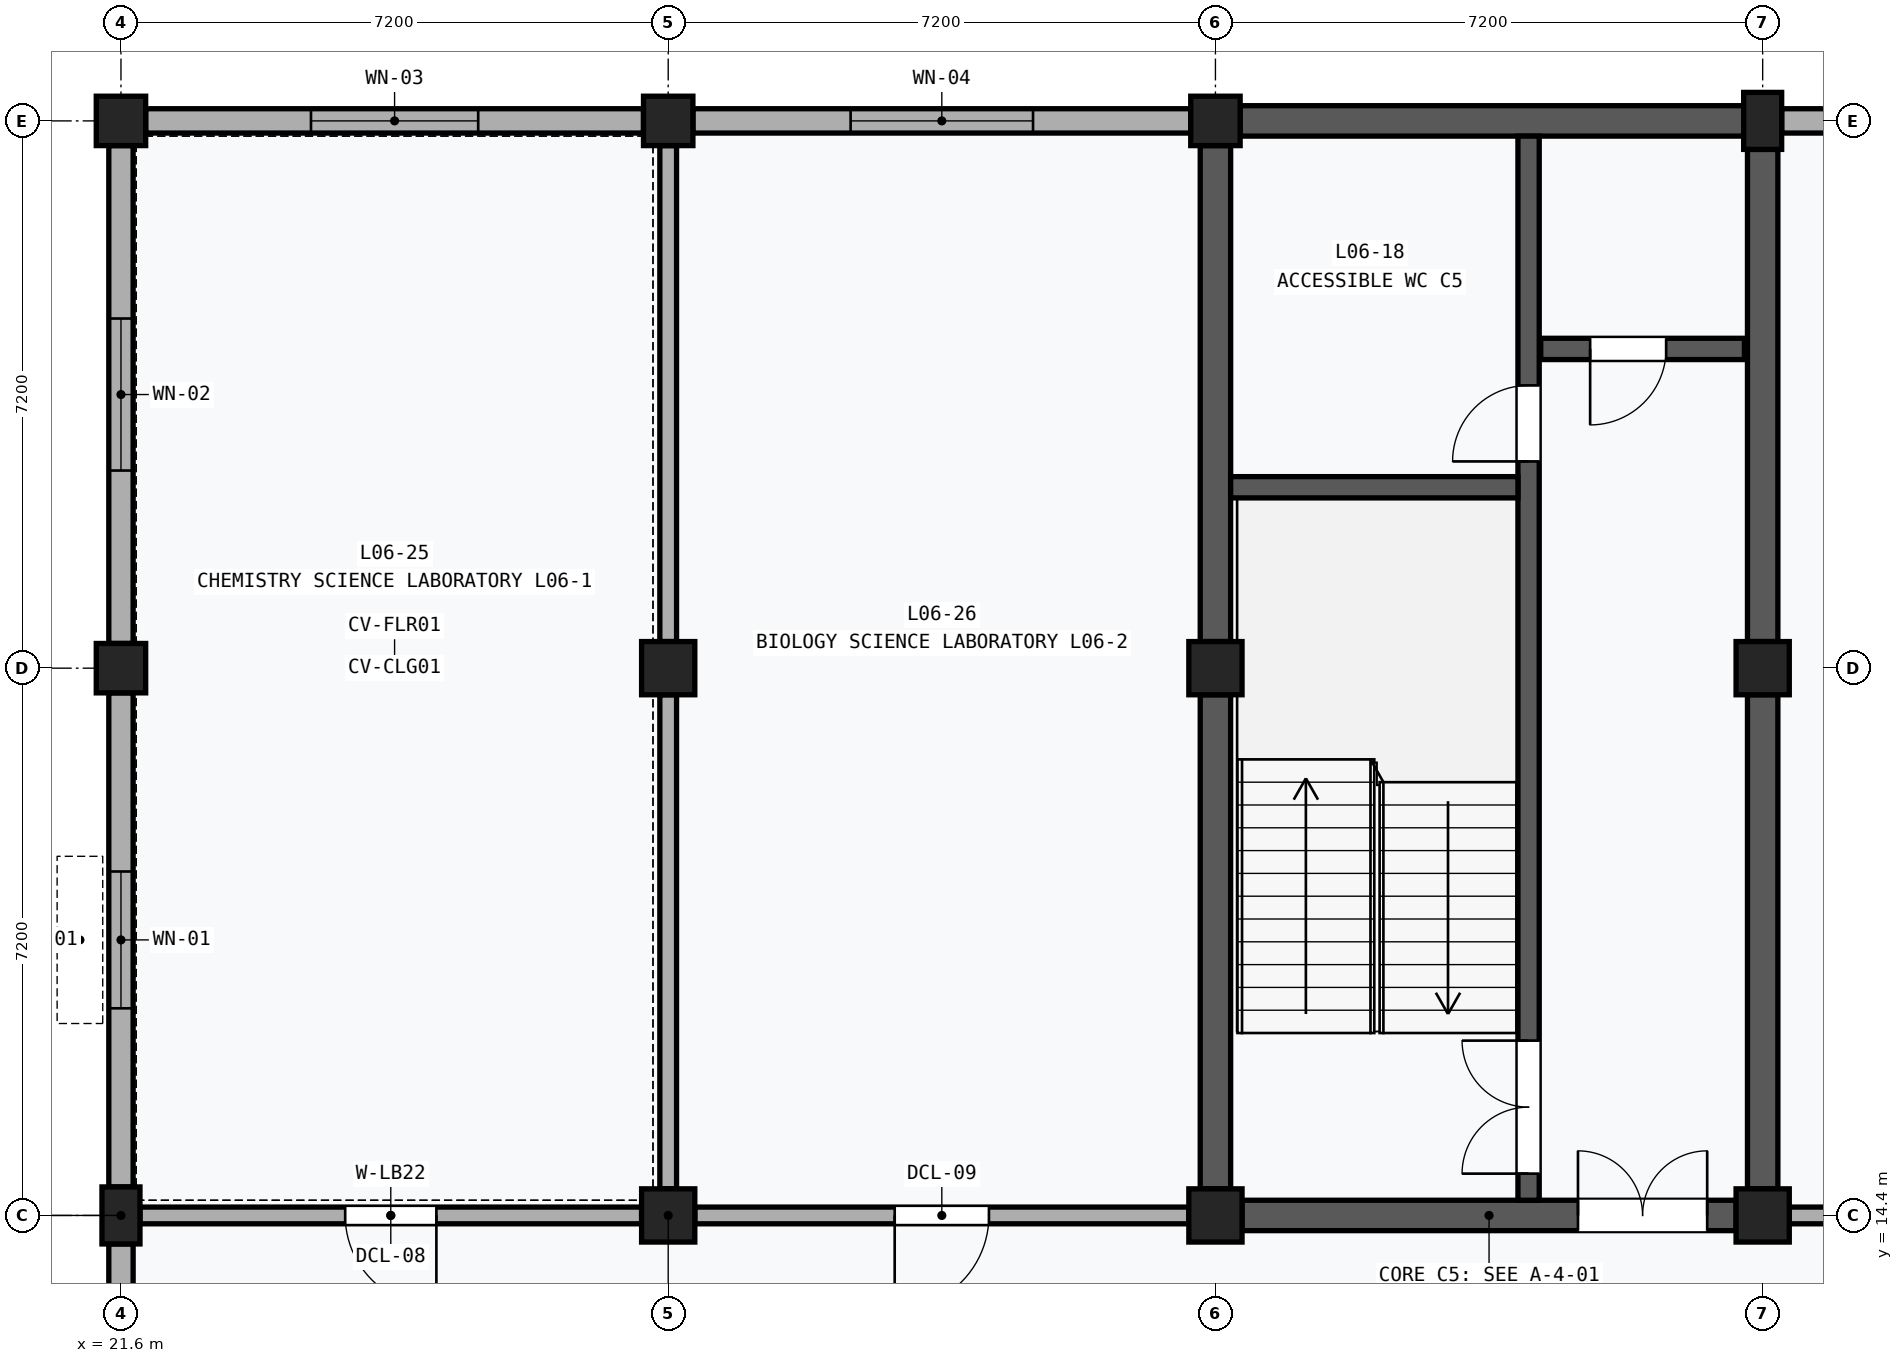
"""IFC4 building model, lengths in metres.
Left out: names, types, materials, properties, quantities, classifications, styles, units other than length and angle.
Written with IfcOpenShell. Run it as: python <this file> out.ifc"""

import sys

from ifc_helpers import new_model, si_unit, direction, frame, frame_2d, origin, origin_2d, place, context, subcontext, project, spatial, rectangle, extrude, element, fill, save


model = new_model("IFC4")
c1 = context("Model", 3, precision=1e-05, world=origin(), true_north=direction((0.0, 1.0)))
c2 = subcontext(c1, "Body", "Model", "MODEL_VIEW")
j1 = project(units=[si_unit("LENGTHUNIT", "METRE"), si_unit("PLANEANGLEUNIT", "RADIAN")], contexts=[c1])
p1 = place(None, origin())
s1 = spatial("IfcSite", under=j1, at=p1, CompositionType="ELEMENT")
p2 = place(p1, origin())
s2 = spatial("IfcBuilding", under=s1, at=p2, CompositionType="ELEMENT")
p3 = place(p2, frame((0.0, 0.0, 26.6)))
s3 = spatial("IfcBuildingStorey", under=s2, at=p3, CompositionType="ELEMENT", Elevation=26.6)
p4 = place(p3, frame((21.6, 14.4, 0.0), z_axis=(0.0, 0.0, 1.0), x_axis=(1.0, 0.0, 0.0)))
e1 = element("IfcColumn", 1, at=p4, inside=s3, PredefinedType="PILASTER", context=c2, shape_type="SweptSolid", body=[
    extrude(rectangle(XDim=0.5, YDim=0.75, at=origin_2d()), origin(), (0.0, 0.0, 1.0), 4.0),
])
for number, where, z_axis, x_axis in (
    (2, (21.6, 21.6, 0.0), (0.0, 0.0, 1.0), (1.0, 0.0, 0.0)),
    (3, (21.6, 28.8, 0.0), (0.0, 0.0, 1.0), (1.0, 0.0, 0.0)),
):
    element("IfcColumn", number, at=place(p3, frame(where, z_axis=z_axis, x_axis=x_axis)), inside=s3, PredefinedType="COLUMN", context=c2, shape_type="SweptSolid", body=[
        extrude(rectangle(XDim=0.65, YDim=0.65, at=origin_2d()), origin(), (0.0, 0.0, 1.0), 4.0),
    ])
for number, where, z_axis, x_axis in (
    (4, (28.8, 14.4, 0.0), (0.0, 0.0, 1.0), (1.0, 0.0, 0.0)),
    (5, (28.8, 21.6, 0.0), (0.0, 0.0, 1.0), (1.0, 0.0, 0.0)),
):
    element("IfcColumn", number, at=place(p3, frame(where, z_axis=z_axis, x_axis=x_axis)), inside=s3, PredefinedType="COLUMN", context=c2, shape_type="SweptSolid", body=[
        extrude(rectangle(XDim=0.7, YDim=0.7, at=origin_2d()), origin(), (0.0, 0.0, 1.0), 4.0),
    ])
p5 = place(p3, frame((28.8, 28.8, 0.0), z_axis=(0.0, 0.0, 1.0), x_axis=(1.0, 0.0, 0.0)))
e6 = element("IfcColumn", 6, at=p5, inside=s3, PredefinedType="COLUMN", context=c2, shape_type="SweptSolid", body=[
    extrude(rectangle(XDim=0.65, YDim=0.65, at=origin_2d()), origin(), (0.0, 0.0, 1.0), 4.0),
])
for number, where, z_axis, x_axis in (
    (7, (36.0, 14.4, 0.0), (0.0, 0.0, 1.0), (1.0, 0.0, 0.0)),
    (8, (36.0, 21.6, 0.0), (0.0, 0.0, 1.0), (1.0, 0.0, 0.0)),
):
    element("IfcColumn", number, at=place(p3, frame(where, z_axis=z_axis, x_axis=x_axis)), inside=s3, PredefinedType="COLUMN", context=c2, shape_type="SweptSolid", body=[
        extrude(rectangle(XDim=0.7, YDim=0.7, at=origin_2d()), origin(), (0.0, 0.0, 1.0), 4.0),
    ])
p6 = place(p3, frame((36.0, 28.8, 0.0), z_axis=(0.0, 0.0, 1.0), x_axis=(1.0, 0.0, 0.0)))
e9 = element("IfcColumn", 9, at=p6, inside=s3, PredefinedType="COLUMN", context=c2, shape_type="SweptSolid", body=[
    extrude(rectangle(XDim=0.65, YDim=0.65, at=origin_2d()), origin(), (0.0, 0.0, 1.0), 4.0),
])
for number, where, z_axis, x_axis in (
    (10, (43.2, 14.4, 0.0), (0.0, 0.0, 1.0), (1.0, 0.0, 0.0)),
    (11, (43.2, 21.6, 0.0), (0.0, 0.0, 1.0), (1.0, 0.0, 0.0)),
):
    element("IfcColumn", number, at=place(p3, frame(where, z_axis=z_axis, x_axis=x_axis)), inside=s3, PredefinedType="COLUMN", context=c2, shape_type="SweptSolid", body=[
        extrude(rectangle(XDim=0.7, YDim=0.7, at=origin_2d()), origin(), (0.0, 0.0, 1.0), 4.0),
    ])
p7 = place(p3, frame((43.2, 28.8, 0.0), z_axis=(0.0, 0.0, 1.0), x_axis=(1.0, 0.0, 0.0)))
e12 = element("IfcColumn", 12, at=p7, inside=s3, PredefinedType="PILASTER", context=c2, shape_type="SweptSolid", body=[
    extrude(rectangle(XDim=0.5, YDim=0.75, at=origin_2d()), origin(), (0.0, 0.0, 1.0), 4.0),
])
p8 = place(p3, frame((21.6, 7.525, 0.0), z_axis=(0.0, 0.0, 1.0), x_axis=(0.0, 1.0, 0.0)))
e13 = element("IfcWall", 13, at=p8, inside=s3, PredefinedType="SOLIDWALL", context=c2, shape_type="SweptSolid", body=[
    extrude(rectangle(XDim=6.5, YDim=0.32, at=frame_2d((3.25, 0.0))), origin(), (0.0, 0.0, 1.0), 3.1),
])
p9 = place(p8, frame((2.5, 0.0, 1.1)))
e14 = element("IfcOpeningElement", 14, at=p9, cuts=e13, PredefinedType="OPENING", context=c2, shape_type="SweptSolid", body=[
    extrude(rectangle(XDim=1.5, YDim=1.35, at=frame_2d((0.75, 0.675))), frame((0.0, 0.172, 0.0), z_axis=(0.0, -1.0, 0.0), x_axis=(1.0, 0.0, 0.0)), (0.0, 0.0, 1.0), 0.344),
])
p10 = place(p3, frame((21.6, 14.775, 0.0), z_axis=(0.0, 0.0, 1.0), x_axis=(0.0, 1.0, 0.0)))
e15 = element("IfcWall", 15, at=p10, inside=s3, PredefinedType="SOLIDWALL", context=c2, shape_type="SweptSolid", body=[
    extrude(rectangle(XDim=6.5, YDim=0.32, at=frame_2d((3.25, 0.0))), origin(), (0.0, 0.0, 1.0), 3.1),
])
p11 = place(p10, frame((2.35, 0.0, 0.9)))
e16 = element("IfcOpeningElement", 16, at=p11, cuts=e15, PredefinedType="OPENING", context=c2, shape_type="SweptSolid", body=[
    extrude(rectangle(XDim=1.8, YDim=1.8, at=frame_2d((0.9, 0.9))), frame((0.0, 0.172, 0.0), z_axis=(0.0, -1.0, 0.0), x_axis=(1.0, 0.0, 0.0)), (0.0, 0.0, 1.0), 0.344),
])
p12 = place(p3, frame((21.925, 28.8, 0.0), z_axis=(0.0, 0.0, 1.0), x_axis=(1.0, 0.0, 0.0)))
e17 = element("IfcWall", 17, at=p12, inside=s3, PredefinedType="SOLIDWALL", context=c2, shape_type="SweptSolid", body=[
    extrude(rectangle(XDim=6.55, YDim=0.32, at=frame_2d((3.275, 0.0))), origin(), (0.0, 0.0, 1.0), 3.1),
])
p13 = place(p12, frame((2.175, 0.0, 0.9)))
e18 = element("IfcOpeningElement", 18, at=p13, cuts=e17, PredefinedType="OPENING", context=c2, shape_type="SweptSolid", body=[
    extrude(rectangle(XDim=2.2, YDim=1.8, at=frame_2d((1.1, 0.9))), frame((0.0, 0.172, 0.0), z_axis=(0.0, -1.0, 0.0), x_axis=(1.0, 0.0, 0.0)), (0.0, 0.0, 1.0), 0.344),
])
p14 = place(p3, frame((21.6, 21.925, 0.0), z_axis=(0.0, 0.0, 1.0), x_axis=(0.0, 1.0, 0.0)))
e19 = element("IfcWall", 19, at=p14, inside=s3, PredefinedType="SOLIDWALL", context=c2, shape_type="SweptSolid", body=[
    extrude(rectangle(XDim=6.55, YDim=0.32, at=frame_2d((3.275, 0.0))), origin(), (0.0, 0.0, 1.0), 3.1),
])
p15 = place(p14, frame((2.275, 0.0, 0.9)))
e20 = element("IfcOpeningElement", 20, at=p15, cuts=e19, PredefinedType="OPENING", context=c2, shape_type="SweptSolid", body=[
    extrude(rectangle(XDim=2.0, YDim=1.8, at=frame_2d((1.0, 0.9))), frame((0.0, 0.172, 0.0), z_axis=(0.0, -1.0, 0.0), x_axis=(1.0, 0.0, 0.0)), (0.0, 0.0, 1.0), 0.344),
])
p16 = place(p3, frame((29.125, 28.8, 0.0), z_axis=(0.0, 0.0, 1.0), x_axis=(1.0, 0.0, 0.0)))
e21 = element("IfcWall", 21, at=p16, inside=s3, PredefinedType="SOLIDWALL", context=c2, shape_type="SweptSolid", body=[
    extrude(rectangle(XDim=6.55, YDim=0.32, at=frame_2d((3.275, 0.0))), origin(), (0.0, 0.0, 1.0), 3.1),
])
p17 = place(p16, frame((2.075, 0.0, 0.9)))
e22 = element("IfcOpeningElement", 22, at=p17, cuts=e21, PredefinedType="OPENING", context=c2, shape_type="SweptSolid", body=[
    extrude(rectangle(XDim=2.4, YDim=1.8, at=frame_2d((1.2, 0.9))), frame((0.0, 0.172, 0.0), z_axis=(0.0, -1.0, 0.0), x_axis=(1.0, 0.0, 0.0)), (0.0, 0.0, 1.0), 0.344),
])
p18 = place(p3, frame((43.45, 28.8, 0.0), z_axis=(0.0, 0.0, 1.0), x_axis=(1.0, 0.0, 0.0)))
e23 = element("IfcWall", 23, at=p18, inside=s3, PredefinedType="SOLIDWALL", context=c2, shape_type="SweptSolid", body=[
    extrude(rectangle(XDim=6.625, YDim=0.32, at=frame_2d((3.312, 0.0))), origin(), (0.0, 0.0, 1.0), 3.1),
])
p19 = place(p18, frame((1.913, 0.0, 0.9)))
e24 = element("IfcOpeningElement", 24, at=p19, cuts=e23, PredefinedType="OPENING", context=c2, shape_type="SweptSolid", body=[
    extrude(rectangle(XDim=2.8, YDim=1.8, at=frame_2d((1.4, 0.9))), frame((0.0, 0.172, 0.0), z_axis=(0.0, -1.0, 0.0), x_axis=(1.0, 0.0, 0.0)), (0.0, 0.0, 1.0), 0.344),
])
p20 = place(p3, frame((36.0, 14.75, 0.0), z_axis=(0.0, 0.0, 1.0), x_axis=(0.0, 1.0, 0.0)))
e25 = element("IfcWall", 25, at=p20, inside=s3, PredefinedType="SHEAR", context=c2, shape_type="SweptSolid", body=[
    extrude(rectangle(XDim=6.5, YDim=0.4, at=frame_2d((3.25, 0.0))), origin(), (0.0, 0.0, 1.0), 2.96),
])
p21 = place(p3, frame((36.0, 21.95, 0.0), z_axis=(0.0, 0.0, 1.0), x_axis=(0.0, 1.0, 0.0)))
e26 = element("IfcWall", 26, at=p21, inside=s3, PredefinedType="SHEAR", context=c2, shape_type="SweptSolid", body=[
    extrude(rectangle(XDim=6.525, YDim=0.4, at=frame_2d((3.263, 0.0))), origin(), (0.0, 0.0, 1.0), 2.96),
])
p22 = place(p3, frame((43.2, 14.75, 0.0), z_axis=(0.0, 0.0, 1.0), x_axis=(0.0, 1.0, 0.0)))
e27 = element("IfcWall", 27, at=p22, inside=s3, PredefinedType="SHEAR", context=c2, shape_type="SweptSolid", body=[
    extrude(rectangle(XDim=6.5, YDim=0.4, at=frame_2d((3.25, 0.0))), origin(), (0.0, 0.0, 1.0), 2.96),
])
p23 = place(p3, frame((43.2, 21.95, 0.0), z_axis=(0.0, 0.0, 1.0), x_axis=(0.0, 1.0, 0.0)))
e28 = element("IfcWall", 28, at=p23, inside=s3, PredefinedType="SHEAR", context=c2, shape_type="SweptSolid", body=[
    extrude(rectangle(XDim=6.475, YDim=0.4, at=frame_2d((3.238, 0.0))), origin(), (0.0, 0.0, 1.0), 2.96),
])
p24 = place(p3, frame((36.35, 14.4, 0.0), z_axis=(0.0, 0.0, 1.0), x_axis=(1.0, 0.0, 0.0)))
e29 = element("IfcWall", 29, at=p24, inside=s3, PredefinedType="SHEAR", context=c2, shape_type="SweptSolid", body=[
    extrude(rectangle(XDim=6.5, YDim=0.4, at=frame_2d((3.25, 0.0))), origin(), (0.0, 0.0, 1.0), 2.96),
])
p25 = place(p24, frame((4.42, 0.0, 0.0)))
e30 = element("IfcOpeningElement", 30, at=p25, cuts=e29, PredefinedType="OPENING", context=c2, shape_type="SweptSolid", body=[
    extrude(rectangle(XDim=1.7, YDim=2.25, at=frame_2d((0.85, 1.125))), frame((0.0, 0.212, 0.0), z_axis=(0.0, -1.0, 0.0), x_axis=(1.0, 0.0, 0.0)), (0.0, 0.0, 1.0), 0.424),
])
p26 = place(p3, frame((36.325, 28.8, 0.0), z_axis=(0.0, 0.0, 1.0), x_axis=(1.0, 0.0, 0.0)))
e31 = element("IfcWall", 31, at=p26, inside=s3, PredefinedType="SHEAR", context=c2, shape_type="SweptSolid", body=[
    extrude(rectangle(XDim=6.625, YDim=0.4, at=frame_2d((3.312, 0.0))), origin(), (0.0, 0.0, 1.0), 3.1),
])
p27 = place(p3, frame((40.12, 14.6, 0.0), z_axis=(0.0, 0.0, 1.0), x_axis=(0.0, 1.0, 0.0)))
e32 = element("IfcWall", 32, at=p27, inside=s3, PredefinedType="SHEAR", context=c2, shape_type="SweptSolid", body=[
    extrude(rectangle(XDim=14.0, YDim=0.28, at=frame_2d((7.0, 0.0))), origin(), (0.0, 0.0, 1.0), 3.73),
])
p28 = place(p27, frame((0.35, 0.0, 0.0)))
e33 = element("IfcOpeningElement", 33, at=p28, cuts=e32, PredefinedType="OPENING", context=c2, shape_type="SweptSolid", body=[
    extrude(rectangle(XDim=1.75, YDim=2.15, at=frame_2d((0.875, 1.075))), frame((0.0, 0.152, 0.0), z_axis=(0.0, -1.0, 0.0), x_axis=(1.0, 0.0, 0.0)), (0.0, 0.0, 1.0), 0.304),
])
p29 = place(p27, frame((9.72, 0.0, 0.0)))
e34 = element("IfcOpeningElement", 34, at=p29, cuts=e32, PredefinedType="OPENING", context=c2, shape_type="SweptSolid", body=[
    extrude(rectangle(XDim=1.0, YDim=2.15, at=frame_2d((0.5, 1.075))), frame((0.0, 0.152, 0.0), z_axis=(0.0, -1.0, 0.0), x_axis=(1.0, 0.0, 0.0)), (0.0, 0.0, 1.0), 0.304),
])
p30 = place(p3, frame((36.2, 23.98, 0.0), z_axis=(0.0, 0.0, 1.0), x_axis=(1.0, 0.0, 0.0)))
e35 = element("IfcWall", 35, at=p30, inside=s3, PredefinedType="SHEAR", context=c2, shape_type="SweptSolid", body=[
    extrude(rectangle(XDim=3.78, YDim=0.28, at=frame_2d((1.89, 0.0))), origin(), (0.0, 0.0, 1.0), 3.73),
])
p31 = place(p3, frame((40.28, 25.8, 0.0), z_axis=(0.0, 0.0, 1.0), x_axis=(1.0, 0.0, 0.0)))
e36 = element("IfcWall", 36, at=p31, inside=s3, PredefinedType="SHEAR", context=c2, shape_type="SweptSolid", body=[
    extrude(rectangle(XDim=2.68, YDim=0.28, at=frame_2d((1.34, 0.0))), origin(), (0.0, 0.0, 1.0), 3.73),
])
p32 = place(p31, frame((0.65, 0.0, 0.0)))
e37 = element("IfcOpeningElement", 37, at=p32, cuts=e36, PredefinedType="OPENING", context=c2, shape_type="SweptSolid", body=[
    extrude(rectangle(XDim=1.0, YDim=2.15, at=frame_2d((0.5, 1.075))), frame((0.0, 0.152, 0.0), z_axis=(0.0, -1.0, 0.0), x_axis=(1.0, 0.0, 0.0)), (0.0, 0.0, 1.0), 0.304),
])
p33 = place(p3, frame((21.85, 14.4, 0.0), z_axis=(0.0, 0.0, 1.0), x_axis=(1.0, 0.0, 0.0)))
e38 = element("IfcWall", 38, at=p33, inside=s3, PredefinedType="PARTITIONING", context=c2, shape_type="SweptSolid", body=[
    extrude(rectangle(XDim=6.6, YDim=0.22, at=frame_2d((3.3, 0.0))), origin(), (0.0, 0.0, 1.0), 2.96),
])
p34 = place(p33, frame((2.7, 0.0, 0.0)))
e39 = element("IfcOpeningElement", 39, at=p34, cuts=e38, PredefinedType="OPENING", context=c2, shape_type="SweptSolid", body=[
    extrude(rectangle(XDim=1.2, YDim=2.24, at=frame_2d((0.6, 1.12))), frame((0.0, 0.122, 0.0), z_axis=(0.0, -1.0, 0.0), x_axis=(1.0, 0.0, 0.0)), (0.0, 0.0, 1.0), 0.244),
])
p35 = place(p3, frame((28.8, 14.75, 0.0), z_axis=(0.0, 0.0, 1.0), x_axis=(0.0, 1.0, 0.0)))
e40 = element("IfcWall", 40, at=p35, inside=s3, PredefinedType="PARTITIONING", context=c2, shape_type="SweptSolid", body=[
    extrude(rectangle(XDim=6.5, YDim=0.22, at=frame_2d((3.25, 0.0))), origin(), (0.0, 0.0, 1.0), 2.96),
])
p36 = place(p3, frame((28.8, 21.95, 0.0), z_axis=(0.0, 0.0, 1.0), x_axis=(0.0, 1.0, 0.0)))
e41 = element("IfcWall", 41, at=p36, inside=s3, PredefinedType="PARTITIONING", context=c2, shape_type="SweptSolid", body=[
    extrude(rectangle(XDim=6.525, YDim=0.22, at=frame_2d((3.263, 0.0))), origin(), (0.0, 0.0, 1.0), 2.96),
])
p37 = place(p3, frame((29.15, 14.4, 0.0), z_axis=(0.0, 0.0, 1.0), x_axis=(1.0, 0.0, 0.0)))
e42 = element("IfcWall", 42, at=p37, inside=s3, PredefinedType="PARTITIONING", context=c2, shape_type="SweptSolid", body=[
    extrude(rectangle(XDim=6.5, YDim=0.22, at=frame_2d((3.25, 0.0))), origin(), (0.0, 0.0, 1.0), 2.96),
])
p38 = place(p37, frame((2.63, 0.0, 0.0)))
e43 = element("IfcOpeningElement", 43, at=p38, cuts=e42, PredefinedType="OPENING", context=c2, shape_type="SweptSolid", body=[
    extrude(rectangle(XDim=1.24, YDim=2.26, at=frame_2d((0.62, 1.13))), frame((0.0, 0.122, 0.0), z_axis=(0.0, -1.0, 0.0), x_axis=(1.0, 0.0, 0.0)), (0.0, 0.0, 1.0), 0.244),
])
p39 = place(p3, frame((43.55, 14.4, 0.0), z_axis=(0.0, 0.0, 1.0), x_axis=(1.0, 0.0, 0.0)))
e44 = element("IfcWall", 44, at=p39, inside=s3, PredefinedType="PARTITIONING", context=c2, shape_type="SweptSolid", body=[
    extrude(rectangle(XDim=6.5, YDim=0.22, at=frame_2d((3.25, 0.0))), origin(), (0.0, 0.0, 1.0), 3.03),
])
p40 = place(p39, frame((2.61, 0.0, 0.0)))
e45 = element("IfcOpeningElement", 45, at=p40, cuts=e44, PredefinedType="OPENING", context=c2, shape_type="SweptSolid", body=[
    extrude(rectangle(XDim=1.28, YDim=2.28, at=frame_2d((0.64, 1.14))), frame((0.0, 0.122, 0.0), z_axis=(0.0, -1.0, 0.0), x_axis=(1.0, 0.0, 0.0)), (0.0, 0.0, 1.0), 0.244),
])
p41 = place(p11, origin())
e46 = element("IfcWindow", 46, at=p41, inside=s3, PartitioningType="SINGLE_PANEL", PredefinedType="WINDOW", context=c2, shape_type="SweptSolid", body=[
    extrude(rectangle(XDim=1.8, YDim=1.8, at=frame_2d((0.9, 0.9))), frame((0.0, 0.03, 0.0), z_axis=(0.0, -1.0, 0.0), x_axis=(1.0, 0.0, 0.0)), (0.0, 0.0, 1.0), 0.06),
])
fill(e16, e46)
p42 = place(p13, origin())
e47 = element("IfcWindow", 47, at=p42, inside=s3, PartitioningType="SINGLE_PANEL", PredefinedType="WINDOW", context=c2, shape_type="SweptSolid", body=[
    extrude(rectangle(XDim=2.2, YDim=1.8, at=frame_2d((1.1, 0.9))), frame((0.0, 0.03, 0.0), z_axis=(0.0, -1.0, 0.0), x_axis=(1.0, 0.0, 0.0)), (0.0, 0.0, 1.0), 0.06),
])
fill(e18, e47)
p43 = place(p15, origin())
e48 = element("IfcWindow", 48, at=p43, inside=s3, PartitioningType="SINGLE_PANEL", PredefinedType="WINDOW", context=c2, shape_type="SweptSolid", body=[
    extrude(rectangle(XDim=2.0, YDim=1.8, at=frame_2d((1.0, 0.9))), frame((0.0, 0.03, 0.0), z_axis=(0.0, -1.0, 0.0), x_axis=(1.0, 0.0, 0.0)), (0.0, 0.0, 1.0), 0.06),
])
fill(e20, e48)
p44 = place(p17, origin())
e49 = element("IfcWindow", 49, at=p44, inside=s3, PartitioningType="SINGLE_PANEL", PredefinedType="WINDOW", context=c2, shape_type="SweptSolid", body=[
    extrude(rectangle(XDim=2.4, YDim=1.8, at=frame_2d((1.2, 0.9))), frame((0.0, 0.03, 0.0), z_axis=(0.0, -1.0, 0.0), x_axis=(1.0, 0.0, 0.0)), (0.0, 0.0, 1.0), 0.06),
])
fill(e22, e49)
p45 = place(p25, origin())
e50 = element("IfcDoor", 50, at=p45, inside=s3, OperationType="DOUBLE_DOOR_SINGLE_SWING", PredefinedType="DOOR", context=c2, shape_type="SweptSolid", body=[
    extrude(rectangle(XDim=1.7, YDim=2.25, at=frame_2d((0.85, 1.125))), frame((0.0, 0.025, 0.0), z_axis=(0.0, -1.0, 0.0), x_axis=(1.0, 0.0, 0.0)), (0.0, 0.0, 1.0), 0.05),
])
fill(e30, e50)
p46 = place(p28, origin())
e51 = element("IfcDoor", 51, at=p46, inside=s3, OperationType="DOUBLE_DOOR_SINGLE_SWING", PredefinedType="DOOR", context=c2, shape_type="SweptSolid", body=[
    extrude(rectangle(XDim=1.75, YDim=2.15, at=frame_2d((0.875, 1.075))), frame((0.0, 0.025, 0.0), z_axis=(0.0, -1.0, 0.0), x_axis=(1.0, 0.0, 0.0)), (0.0, 0.0, 1.0), 0.05),
])
fill(e33, e51)
p47 = place(p29, origin())
e52 = element("IfcDoor", 52, at=p47, inside=s3, OperationType="SINGLE_SWING_LEFT", PredefinedType="DOOR", context=c2, shape_type="SweptSolid", body=[
    extrude(rectangle(XDim=1.0, YDim=2.15, at=frame_2d((0.5, 1.075))), frame((0.0, 0.025, 0.0), z_axis=(0.0, -1.0, 0.0), x_axis=(1.0, 0.0, 0.0)), (0.0, 0.0, 1.0), 0.05),
])
fill(e34, e52)
p48 = place(p32, frame((1.0, 0.0, 0.0), z_axis=(0.0, 0.0, 1.0), x_axis=(-1.0, 0.0, 0.0)))
e53 = element("IfcDoor", 53, at=p48, inside=s3, OperationType="SINGLE_SWING_RIGHT", PredefinedType="DOOR", context=c2, shape_type="SweptSolid", body=[
    extrude(rectangle(XDim=1.0, YDim=2.15, at=frame_2d((0.5, 1.075))), frame((0.0, 0.025, 0.0), z_axis=(0.0, -1.0, 0.0), x_axis=(1.0, 0.0, 0.0)), (0.0, 0.0, 1.0), 0.05),
])
fill(e37, e53)
p49 = place(p34, frame((1.2, 0.0, 0.0), z_axis=(0.0, 0.0, 1.0), x_axis=(-1.0, 0.0, 0.0)))
e54 = element("IfcDoor", 54, at=p49, inside=s3, OperationType="SINGLE_SWING_LEFT", PredefinedType="DOOR", context=c2, shape_type="SweptSolid", body=[
    extrude(rectangle(XDim=1.2, YDim=2.24, at=frame_2d((0.6, 1.12))), frame((0.0, 0.025, 0.0), z_axis=(0.0, -1.0, 0.0), x_axis=(1.0, 0.0, 0.0)), (0.0, 0.0, 1.0), 0.05),
])
fill(e39, e54)
p50 = place(p38, frame((1.24, 0.0, 0.0), z_axis=(0.0, 0.0, 1.0), x_axis=(-1.0, 0.0, 0.0)))
e55 = element("IfcDoor", 55, at=p50, inside=s3, OperationType="SINGLE_SWING_RIGHT", PredefinedType="DOOR", context=c2, shape_type="SweptSolid", body=[
    extrude(rectangle(XDim=1.24, YDim=2.26, at=frame_2d((0.62, 1.13))), frame((0.0, 0.025, 0.0), z_axis=(0.0, -1.0, 0.0), x_axis=(1.0, 0.0, 0.0)), (0.0, 0.0, 1.0), 0.05),
])
fill(e43, e55)
save(model, sys.argv[1])
